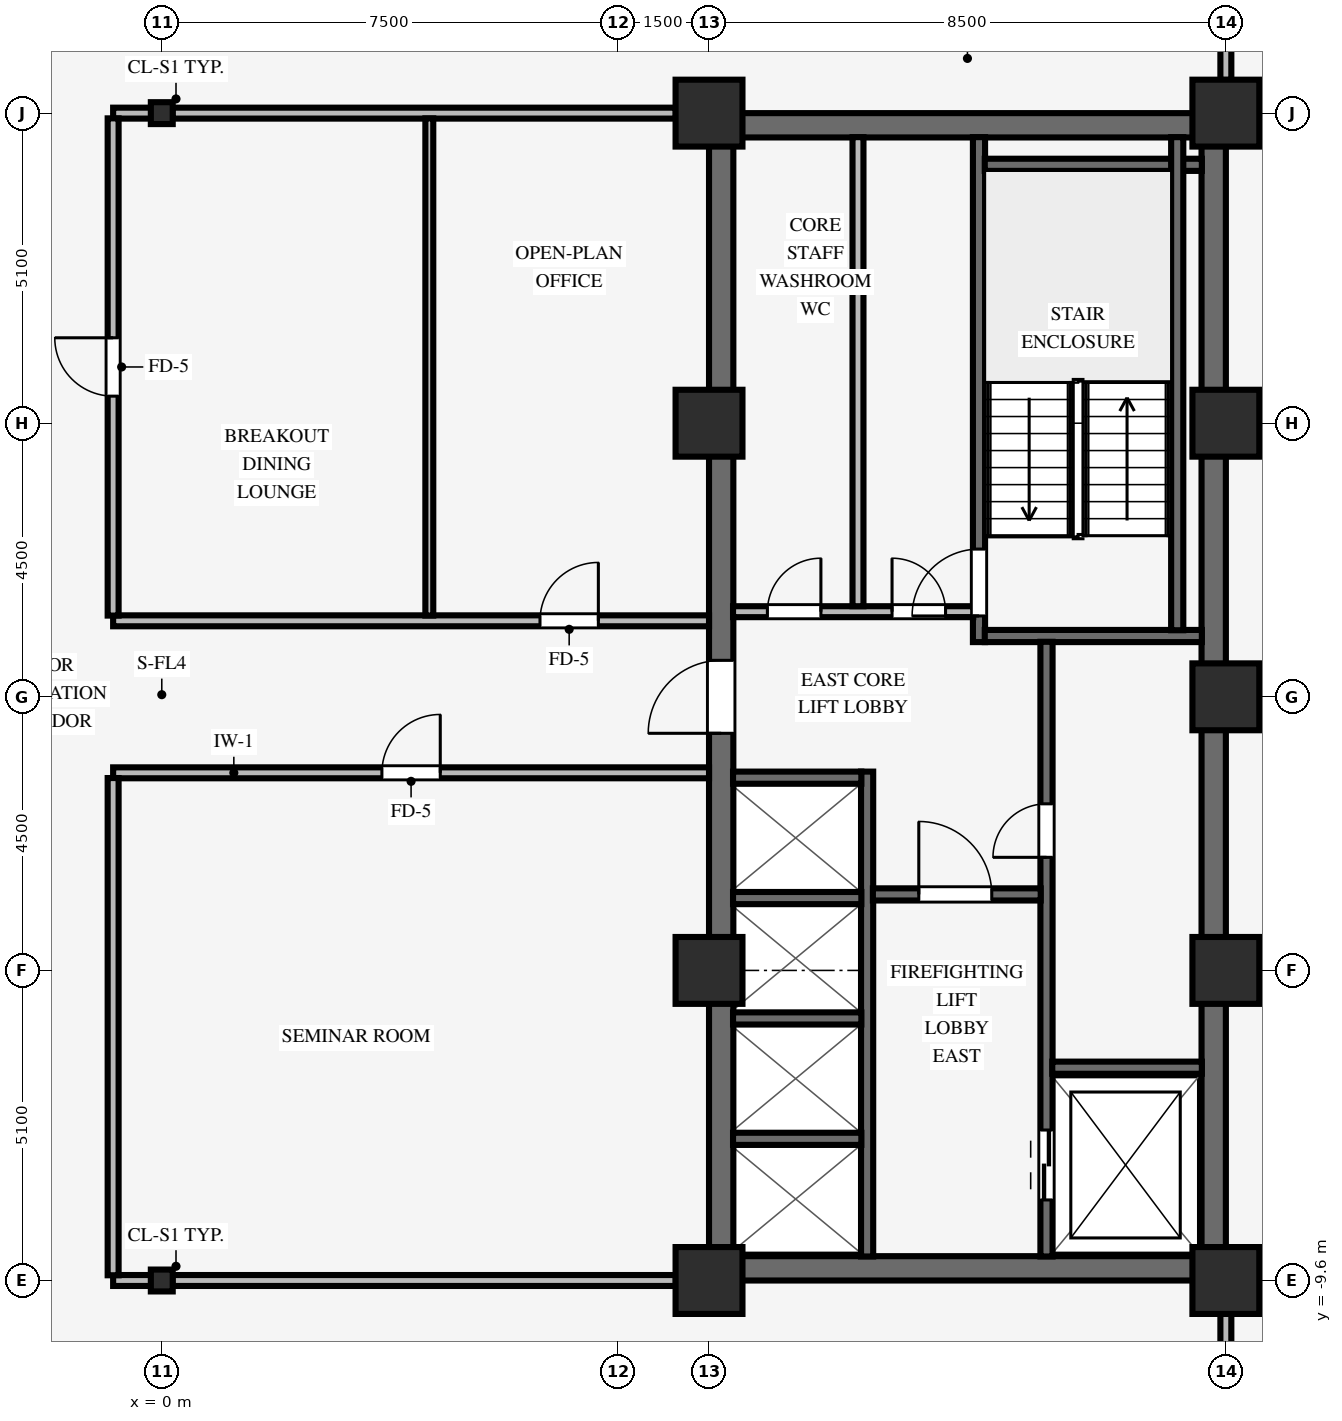
"""IFC4 building model, lengths in metres.
Left out: names, types, materials, properties, quantities, classifications, styles, units other than length and angle.
Written with IfcOpenShell. Run it as: python <this file> out.ifc"""

import sys

from ifc_helpers import new_model, si_unit, direction, frame, frame_2d, origin, origin_2d, place, context, subcontext, project, spatial, rectangle, i_section, extrude, source, transform, mapped, element, fill, save


model = new_model("IFC4")
c1 = context("Model", 3, precision=1e-05, world=origin(), true_north=direction((0.0, 1.0)))
c2 = subcontext(c1, "Body", "Model", "MODEL_VIEW")
j1 = project(units=[si_unit("LENGTHUNIT", "METRE"), si_unit("PLANEANGLEUNIT", "RADIAN")], contexts=[c1])
p1 = place(None, origin())
s1 = spatial("IfcSite", under=j1, at=p1, CompositionType="ELEMENT")
p2 = place(p1, origin())
s2 = spatial("IfcBuilding", under=s1, at=p2, CompositionType="ELEMENT")
p3 = place(p2, frame((0.0, 0.0, 101.95)))
s3 = spatial("IfcBuildingStorey", under=s2, at=p3, CompositionType="ELEMENT", Elevation=101.95)
for number, where, z_axis, x_axis in (
    (1, (9.0, -9.4, 0.0), (0.0, 0.0, 1.0), (1.0, 0.0, 0.0)),
    (2, (9.0, 9.4, 0.0), (0.0, 0.0, 1.0), (1.0, 0.0, 0.0)),
):
    element("IfcWall", number, at=place(p3, frame(where, z_axis=z_axis, x_axis=x_axis)), inside=s3, PredefinedType="SHEAR", context=c2, shape_type="SweptSolid", body=[
        extrude(rectangle(XDim=8.5, YDim=0.4, at=frame_2d((4.25, 0.0))), origin(), (0.0, 0.0, 1.0), 3.37),
    ])
p4 = place(p3, frame((9.2, -9.205, 0.0), z_axis=(0.0, 0.0, 1.0), x_axis=(0.0, 1.0, 0.0)))
e3 = element("IfcWall", 3, at=p4, inside=s3, PredefinedType="SHEAR", context=c2, shape_type="SweptSolid", body=[
    extrude(rectangle(XDim=18.41, YDim=0.4, at=frame_2d((9.205, 0.0))), origin(), (0.0, 0.0, 1.0), 3.37),
])
p5 = place(p4, frame((8.605, 0.0, 0.0)))
e4 = element("IfcOpeningElement", 4, at=p5, cuts=e3, PredefinedType="OPENING", context=c2, shape_type="SweptSolid", body=[
    extrude(rectangle(XDim=1.2, YDim=2.15, at=frame_2d((0.6, 1.075))), frame((0.0, 0.21, 0.0), z_axis=(0.0, -1.0, 0.0), x_axis=(1.0, 0.0, 0.0)), (0.0, 0.0, 1.0), 0.42),
])
p6 = place(p3, frame((17.3, -9.205, 0.0), z_axis=(0.0, 0.0, 1.0), x_axis=(0.0, 1.0, 0.0)))
e5 = element("IfcWall", 5, at=p6, inside=s3, PredefinedType="SHEAR", context=c2, shape_type="SweptSolid", body=[
    extrude(rectangle(XDim=18.41, YDim=0.4, at=frame_2d((9.205, 0.0))), origin(), (0.0, 0.0, 1.0), 3.37),
])
for number, where, z_axis, x_axis in (
    (6, (9.0, -9.6, 0.0), (0.0, 0.0, 1.0), (1.0, 0.0, 0.0)),
    (7, (9.0, -4.5, 0.0), (0.0, 0.0, 1.0), (1.0, 0.0, 0.0)),
    (8, (9.0, 4.5, 0.0), (0.0, 0.0, 1.0), (1.0, 0.0, 0.0)),
    (9, (9.0, 9.6, 0.0), (0.0, 0.0, 1.0), (1.0, 0.0, 0.0)),
    (10, (17.5, -9.6, 0.0), (0.0, 0.0, 1.0), (1.0, 0.0, 0.0)),
    (11, (17.5, -4.5, 0.0), (0.0, 0.0, 1.0), (1.0, 0.0, 0.0)),
    (12, (17.5, 4.5, 0.0), (0.0, 0.0, 1.0), (1.0, 0.0, 0.0)),
    (13, (17.5, 9.6, 0.0), (0.0, 0.0, 1.0), (1.0, 0.0, 0.0)),
    (14, (17.5, 0.0, 0.0), (0.0, 0.0, 1.0), (1.0, 0.0, 0.0)),
):
    element("IfcColumn", number, at=place(p3, frame(where, z_axis=z_axis, x_axis=x_axis)), inside=s3, PredefinedType="COLUMN", context=c2, shape_type="SweptSolid", body=[
        extrude(rectangle(XDim=1.1, YDim=1.1, at=origin_2d()), origin(), (0.0, 0.0, 1.0), 3.37),
    ])
for number, where, z_axis, x_axis in (
    (15, (0.0, -9.6, 0.0), (0.0, 0.0, 1.0), (1.0, 0.0, 0.0)),
    (16, (0.0, 9.6, 0.0), (0.0, 0.0, 1.0), (1.0, 0.0, 0.0)),
):
    element("IfcColumn", number, at=place(p3, frame(where, z_axis=z_axis, x_axis=x_axis)), inside=s3, PredefinedType="COLUMN", context=c2, shape_type="SweptSolid", body=[
        extrude(i_section(OverallWidth=0.36, OverallDepth=0.36, WebThickness=0.021, FlangeThickness=0.021, FilletRadius=0.018, at=origin_2d()), origin(), (0.0, 0.0, 1.0), 3.37),
    ])
p7 = place(p3, frame((13.44, 0.9, 0.0), z_axis=(0.0, 0.0, 1.0), x_axis=(0.0, 1.0, 0.0)))
e17 = element("IfcWall", 17, at=p7, inside=s3, PredefinedType="SHEAR", context=c2, shape_type="SweptSolid", body=[
    extrude(rectangle(XDim=8.305, YDim=0.2, at=frame_2d((4.153, 0.0))), origin(), (0.0, 0.0, 1.0), 3.37),
])
p8 = place(p7, frame((0.43, 0.0, 0.0)))
e18 = element("IfcOpeningElement", 18, at=p8, cuts=e17, PredefinedType="OPENING", context=c2, shape_type="SweptSolid", body=[
    extrude(rectangle(XDim=1.1, YDim=2.15, at=frame_2d((0.55, 1.075))), frame((0.0, 0.11, 0.0), z_axis=(0.0, -1.0, 0.0), x_axis=(1.0, 0.0, 0.0)), (0.0, 0.0, 1.0), 0.22),
])
for number, where, z_axis, x_axis in (
    (19, (13.535, 1.0, 0.0), (0.0, 0.0, 1.0), (1.0, 0.0, 0.0)),
    (20, (13.535, 8.75, 0.0), (0.0, 0.0, 1.0), (1.0, 0.0, 0.0)),
):
    element("IfcWall", number, at=place(p3, frame(where, z_axis=z_axis, x_axis=x_axis)), inside=s3, PredefinedType="SHEAR", context=c2, shape_type="SweptSolid", body=[
        extrude(rectangle(XDim=3.57, YDim=0.2, at=frame_2d((1.785, 0.0))), origin(), (0.0, 0.0, 1.0), 3.37),
    ])
p9 = place(p3, frame((16.7, 1.095, 0.0), z_axis=(0.0, 0.0, 1.0), x_axis=(0.0, 1.0, 0.0)))
e21 = element("IfcWall", 21, at=p9, inside=s3, PredefinedType="SHEAR", context=c2, shape_type="SweptSolid", body=[
    extrude(rectangle(XDim=8.11, YDim=0.2, at=frame_2d((4.055, 0.0))), origin(), (0.0, 0.0, 1.0), 3.37),
])
p10 = place(p3, frame((14.55, -9.205, 0.0), z_axis=(0.0, 0.0, 1.0), x_axis=(0.0, 1.0, 0.0)))
e22 = element("IfcWall", 22, at=p10, inside=s3, PredefinedType="SHEAR", context=c2, shape_type="SweptSolid", body=[
    extrude(rectangle(XDim=10.11, YDim=0.2, at=frame_2d((5.055, 0.0))), origin(), (0.0, 0.0, 1.0), 3.37),
])
p11 = place(p10, frame((6.565, 0.0, 0.0)))
e23 = element("IfcOpeningElement", 23, at=p11, cuts=e22, PredefinedType="OPENING", context=c2, shape_type="SweptSolid", body=[
    extrude(rectangle(XDim=0.88, YDim=2.1, at=frame_2d((0.44, 1.05))), frame((0.0, 0.11, 0.0), z_axis=(0.0, -1.0, 0.0), x_axis=(1.0, 0.0, 0.0)), (0.0, 0.0, 1.0), 0.22),
])
p12 = place(p10, frame((0.93, 0.0, 0.0)))
e24 = element("IfcOpeningElement", 24, at=p12, cuts=e22, PredefinedType="OPENING", context=c2, shape_type="SweptSolid", body=[
    extrude(rectangle(XDim=1.15, YDim=2.15, at=frame_2d((0.575, 1.075))), frame((0.0, 0.11, 0.0), z_axis=(0.0, -1.0, 0.0), x_axis=(1.0, 0.0, 0.0)), (0.0, 0.0, 1.0), 0.22),
])
p13 = place(p3, frame((14.645, -6.1, 0.0), z_axis=(0.0, 0.0, 1.0), x_axis=(1.0, 0.0, 0.0)))
e25 = element("IfcWall", 25, at=p13, inside=s3, PredefinedType="SHEAR", context=c2, shape_type="SweptSolid", body=[
    extrude(rectangle(XDim=2.46, YDim=0.2, at=frame_2d((1.23, 0.0))), origin(), (0.0, 0.0, 1.0), 3.37),
])
p14 = place(p3, frame((11.6, -9.205, 0.0), z_axis=(0.0, 0.0, 1.0), x_axis=(0.0, 1.0, 0.0)))
e26 = element("IfcWall", 26, at=p14, inside=s3, PredefinedType="SHEAR", context=c2, shape_type="SweptSolid", body=[
    extrude(rectangle(XDim=7.975, YDim=0.2, at=frame_2d((3.988, 0.0))), origin(), (0.0, 0.0, 1.0), 3.37),
])
p15 = place(p3, frame((11.695, -3.25, 0.0), z_axis=(0.0, 0.0, 1.0), x_axis=(1.0, 0.0, 0.0)))
e27 = element("IfcWall", 27, at=p15, inside=s3, PredefinedType="SHEAR", context=c2, shape_type="SweptSolid", body=[
    extrude(rectangle(XDim=2.76, YDim=0.2, at=frame_2d((1.38, 0.0))), origin(), (0.0, 0.0, 1.0), 3.37),
])
p16 = place(p15, frame((0.755, 0.0, 0.0)))
e28 = element("IfcOpeningElement", 28, at=p16, cuts=e27, PredefinedType="OPENING", context=c2, shape_type="SweptSolid", body=[
    extrude(rectangle(XDim=1.2, YDim=2.15, at=frame_2d((0.6, 1.075))), frame((0.0, 0.11, 0.0), z_axis=(0.0, -1.0, 0.0), x_axis=(1.0, 0.0, 0.0)), (0.0, 0.0, 1.0), 0.22),
])
for number, where, z_axis, x_axis in (
    (29, (9.395, -7.27, 0.0), (0.0, 0.0, 1.0), (1.0, 0.0, 0.0)),
    (30, (9.395, -5.29, 0.0), (0.0, 0.0, 1.0), (1.0, 0.0, 0.0)),
    (31, (9.395, -3.31, 0.0), (0.0, 0.0, 1.0), (1.0, 0.0, 0.0)),
    (32, (9.395, -1.33, 0.0), (0.0, 0.0, 1.0), (1.0, 0.0, 0.0)),
):
    element("IfcWall", number, at=place(p3, frame(where, z_axis=z_axis, x_axis=x_axis)), inside=s3, PredefinedType="SHEAR", context=c2, shape_type="SweptSolid", body=[
        extrude(rectangle(XDim=2.11, YDim=0.2, at=frame_2d((1.055, 0.0))), origin(), (0.0, 0.0, 1.0), 3.37),
    ])
p17 = place(p3, frame((9.395, 1.4, 0.0), z_axis=(0.0, 0.0, 1.0), x_axis=(1.0, 0.0, 0.0)))
e33 = element("IfcWall", 33, at=p17, inside=s3, PredefinedType="PARTITIONING", context=c2, shape_type="SweptSolid", body=[
    extrude(rectangle(XDim=3.95, YDim=0.18, at=frame_2d((1.975, 0.0))), origin(), (0.0, 0.0, 1.0), 3.36),
])
p18 = place(p17, frame((0.565, 0.0, 0.0)))
e34 = element("IfcOpeningElement", 34, at=p18, cuts=e33, PredefinedType="OPENING", context=c2, shape_type="SweptSolid", body=[
    extrude(rectangle(XDim=0.88, YDim=2.1, at=frame_2d((0.44, 1.05))), frame((0.0, 0.1, 0.0), z_axis=(0.0, -1.0, 0.0), x_axis=(1.0, 0.0, 0.0)), (0.0, 0.0, 1.0), 0.2),
])
p19 = place(p17, frame((2.615, 0.0, 0.0)))
e35 = element("IfcOpeningElement", 35, at=p19, cuts=e33, PredefinedType="OPENING", context=c2, shape_type="SweptSolid", body=[
    extrude(rectangle(XDim=0.88, YDim=2.1, at=frame_2d((0.44, 1.05))), frame((0.0, 0.1, 0.0), z_axis=(0.0, -1.0, 0.0), x_axis=(1.0, 0.0, 0.0)), (0.0, 0.0, 1.0), 0.2),
])
p20 = place(p3, frame((11.45, 1.49, 0.0), z_axis=(0.0, 0.0, 1.0), x_axis=(0.0, 1.0, 0.0)))
e36 = element("IfcWall", 36, at=p20, inside=s3, PredefinedType="PARTITIONING", context=c2, shape_type="SweptSolid", body=[
    extrude(rectangle(XDim=7.715, YDim=0.18, at=frame_2d((3.857, 0.0))), origin(), (0.0, 0.0, 1.0), 3.36),
])
p21 = place(p3, frame((-0.8, -9.6, 0.0), z_axis=(0.0, 0.0, 1.0), x_axis=(1.0, 0.0, 0.0)))
e37 = element("IfcWall", 37, at=p21, inside=s3, PredefinedType="PARTITIONING", context=c2, shape_type="SweptSolid", body=[
    extrude(rectangle(XDim=0.624, YDim=0.18, at=frame_2d((0.312, 0.0))), origin(), (0.0, 0.0, 1.0), 2.405),
])
p22 = place(p3, frame((0.176, -9.6, 0.0), z_axis=(0.0, 0.0, 1.0), x_axis=(1.0, 0.0, 0.0)))
e38 = element("IfcWall", 38, at=p22, inside=s3, PredefinedType="PARTITIONING", context=c2, shape_type="SweptSolid", body=[
    extrude(rectangle(XDim=8.278, YDim=0.18, at=frame_2d((4.139, 0.0))), origin(), (0.0, 0.0, 1.0), 2.405),
])
p23 = place(p3, frame((-0.8, -1.25, 0.0), z_axis=(0.0, 0.0, 1.0), x_axis=(1.0, 0.0, 0.0)))
e39 = element("IfcWall", 39, at=p23, inside=s3, PredefinedType="PARTITIONING", context=c2, shape_type="SweptSolid", body=[
    extrude(rectangle(XDim=9.8, YDim=0.18, at=frame_2d((4.9, 0.0))), origin(), (0.0, 0.0, 1.0), 3.36),
])
p24 = place(p23, frame((4.42, 0.0, 0.0)))
e40 = element("IfcOpeningElement", 40, at=p24, cuts=e39, PredefinedType="OPENING", context=c2, shape_type="SweptSolid", body=[
    extrude(rectangle(XDim=0.96, YDim=2.1, at=frame_2d((0.48, 1.05))), frame((0.0, 0.1, 0.0), z_axis=(0.0, -1.0, 0.0), x_axis=(1.0, 0.0, 0.0)), (0.0, 0.0, 1.0), 0.2),
])
p25 = place(p3, frame((-0.8, 1.25, 0.0), z_axis=(0.0, 0.0, 1.0), x_axis=(1.0, 0.0, 0.0)))
e41 = element("IfcWall", 41, at=p25, inside=s3, PredefinedType="PARTITIONING", context=c2, shape_type="SweptSolid", body=[
    extrude(rectangle(XDim=9.8, YDim=0.18, at=frame_2d((4.9, 0.0))), origin(), (0.0, 0.0, 1.0), 3.36),
])
p26 = place(p25, frame((7.02, 0.0, 0.0)))
e42 = element("IfcOpeningElement", 42, at=p26, cuts=e41, PredefinedType="OPENING", context=c2, shape_type="SweptSolid", body=[
    extrude(rectangle(XDim=0.96, YDim=2.1, at=frame_2d((0.48, 1.05))), frame((0.0, 0.1, 0.0), z_axis=(0.0, -1.0, 0.0), x_axis=(1.0, 0.0, 0.0)), (0.0, 0.0, 1.0), 0.2),
])
p27 = place(p3, frame((-0.8, 9.6, 0.0), z_axis=(0.0, 0.0, 1.0), x_axis=(1.0, 0.0, 0.0)))
e43 = element("IfcWall", 43, at=p27, inside=s3, PredefinedType="PARTITIONING", context=c2, shape_type="SweptSolid", body=[
    extrude(rectangle(XDim=0.624, YDim=0.18, at=frame_2d((0.312, 0.0))), origin(), (0.0, 0.0, 1.0), 2.405),
])
p28 = place(p3, frame((0.176, 9.6, 0.0), z_axis=(0.0, 0.0, 1.0), x_axis=(1.0, 0.0, 0.0)))
e44 = element("IfcWall", 44, at=p28, inside=s3, PredefinedType="PARTITIONING", context=c2, shape_type="SweptSolid", body=[
    extrude(rectangle(XDim=8.278, YDim=0.18, at=frame_2d((4.139, 0.0))), origin(), (0.0, 0.0, 1.0), 2.405),
])
p29 = place(p3, frame((-0.8, -9.514, 0.0), z_axis=(0.0, 0.0, 1.0), x_axis=(0.0, 1.0, 0.0)))
e45 = element("IfcWall", 45, at=p29, inside=s3, PredefinedType="PARTITIONING", context=c2, shape_type="SweptSolid", body=[
    extrude(rectangle(XDim=8.178, YDim=0.18, at=frame_2d((4.089, 0.0))), origin(), (0.0, 0.0, 1.0), 3.36),
])
p30 = place(p3, frame((-0.8, 1.336, 0.0), z_axis=(0.0, 0.0, 1.0), x_axis=(0.0, 1.0, 0.0)))
e46 = element("IfcWall", 46, at=p30, inside=s3, PredefinedType="PARTITIONING", context=c2, shape_type="SweptSolid", body=[
    extrude(rectangle(XDim=8.178, YDim=0.18, at=frame_2d((4.089, 0.0))), origin(), (0.0, 0.0, 1.0), 3.36),
])
p31 = place(p30, frame((3.609, 0.0, 0.0)))
e47 = element("IfcOpeningElement", 47, at=p31, cuts=e46, PredefinedType="OPENING", context=c2, shape_type="SweptSolid", body=[
    extrude(rectangle(XDim=0.96, YDim=2.1, at=frame_2d((0.48, 1.05))), frame((0.0, 0.1, 0.0), z_axis=(0.0, -1.0, 0.0), x_axis=(1.0, 0.0, 0.0)), (0.0, 0.0, 1.0), 0.2),
])
p32 = place(p3, frame((4.4, 1.336, 0.0), z_axis=(0.0, 0.0, 1.0), x_axis=(0.0, 1.0, 0.0)))
e48 = element("IfcWall", 48, at=p32, inside=s3, PredefinedType="PARTITIONING", context=c2, shape_type="SweptSolid", body=[
    extrude(rectangle(XDim=8.178, YDim=0.13, at=frame_2d((4.089, 0.0))), origin(), (0.0, 0.0, 1.0), 3.36),
])
for number, where, z_axis, x_axis in (
    (49, (17.5, -11.114, 0.0), (0.0, 0.0, 1.0), (0.0, 1.0, 0.0)),
    (50, (17.5, 10.146, 0.0), (0.0, 0.0, 1.0), (0.0, 1.0, 0.0)),
):
    element("IfcWall", number, at=place(p3, frame(where, z_axis=z_axis, x_axis=x_axis)), inside=s3, PredefinedType="PARTITIONING", context=c2, shape_type="SweptSolid", body=[
        extrude(rectangle(XDim=0.968, YDim=0.18, at=frame_2d((0.484, 0.0))), origin(), (0.0, 0.0, 1.0), 2.738),
    ])
m1 = source(origin(), c2, "Body", "SweptSolid", [
    extrude(rectangle(XDim=1.1, YDim=2.15, at=frame_2d((0.55, 1.075))), frame((0.0, 0.025, 0.0), z_axis=(0.0, -1.0, 0.0), x_axis=(1.0, 0.0, 0.0)), (0.0, 0.0, 1.0), 0.05),
])
p33 = place(p8, origin())
e51 = element("IfcDoor", 51, at=p33, inside=s3, OperationType="SINGLE_SWING_LEFT", PredefinedType="DOOR", context=c2, shape_type="MappedRepresentation", body=[
    mapped(m1, transform((0.0, 0.0, 0.0), scale=1.0)),
])
fill(e18, e51)
m2 = source(origin(), c2, "Body", "SweptSolid", [
    extrude(rectangle(XDim=0.88, YDim=2.1, at=frame_2d((0.44, 1.05))), frame((0.0, 0.025, 0.0), z_axis=(0.0, -1.0, 0.0), x_axis=(1.0, 0.0, 0.0)), (0.0, 0.0, 1.0), 0.05),
])
p34 = place(p11, origin())
e52 = element("IfcDoor", 52, at=p34, inside=s3, OperationType="SINGLE_SWING_LEFT", PredefinedType="DOOR", context=c2, shape_type="MappedRepresentation", body=[
    mapped(m2, transform((0.0, 0.0, 0.0), scale=1.0)),
])
fill(e23, e52)
m3 = source(origin(), c2, "Body", "SweptSolid", [
    extrude(rectangle(XDim=1.2, YDim=2.15, at=frame_2d((0.6, 1.075))), frame((0.0, 0.025, 0.0), z_axis=(0.0, -1.0, 0.0), x_axis=(1.0, 0.0, 0.0)), (0.0, 0.0, 1.0), 0.05),
])
p35 = place(p16, origin())
e53 = element("IfcDoor", 53, at=p35, inside=s3, OperationType="SINGLE_SWING_LEFT", PredefinedType="DOOR", context=c2, shape_type="MappedRepresentation", body=[
    mapped(m3, transform((0.0, 0.0, 0.0), scale=1.0)),
])
fill(e28, e53)
p36 = place(p5, origin())
e54 = element("IfcDoor", 54, at=p36, inside=s3, OperationType="SINGLE_SWING_LEFT", PredefinedType="DOOR", context=c2, shape_type="MappedRepresentation", body=[
    mapped(m3, transform((0.0, 0.0, 0.0), scale=1.0)),
])
fill(e4, e54)
p37 = place(p18, origin())
e55 = element("IfcDoor", 55, at=p37, inside=s3, OperationType="SINGLE_SWING_RIGHT", PredefinedType="DOOR", context=c2, shape_type="MappedRepresentation", body=[
    mapped(m2, transform((0.0, 0.0, 0.0), scale=1.0)),
])
fill(e34, e55)
p38 = place(p19, origin())
e56 = element("IfcDoor", 56, at=p38, inside=s3, OperationType="SINGLE_SWING_LEFT", PredefinedType="DOOR", context=c2, shape_type="MappedRepresentation", body=[
    mapped(m2, transform((0.0, 0.0, 0.0), scale=1.0)),
])
fill(e35, e56)
m4 = source(origin(), c2, "Body", "SweptSolid", [
    extrude(rectangle(XDim=1.15, YDim=2.15, at=frame_2d((0.575, 1.075))), frame((0.0, 0.025, 0.0), z_axis=(0.0, -1.0, 0.0), x_axis=(1.0, 0.0, 0.0)), (0.0, 0.0, 1.0), 0.05),
])
p39 = place(p12, origin())
e57 = element("IfcDoor", 57, at=p39, inside=s3, OperationType="DOUBLE_DOOR_SLIDING", PredefinedType="DOOR", context=c2, shape_type="MappedRepresentation", body=[
    mapped(m4, transform((0.0, 0.0, 0.0), scale=1.0)),
])
fill(e24, e57)
m5 = source(origin(), c2, "Body", "SweptSolid", [
    extrude(rectangle(XDim=0.96, YDim=2.1, at=frame_2d((0.48, 1.05))), frame((0.0, 0.025, 0.0), z_axis=(0.0, -1.0, 0.0), x_axis=(1.0, 0.0, 0.0)), (0.0, 0.0, 1.0), 0.05),
])
p40 = place(p24, origin())
e58 = element("IfcDoor", 58, at=p40, inside=s3, OperationType="SINGLE_SWING_RIGHT", PredefinedType="DOOR", context=c2, shape_type="MappedRepresentation", body=[
    mapped(m5, transform((0.0, 0.0, 0.0), scale=1.0)),
])
fill(e40, e58)
p41 = place(p31, origin())
e59 = element("IfcDoor", 59, at=p41, inside=s3, OperationType="SINGLE_SWING_RIGHT", PredefinedType="DOOR", context=c2, shape_type="MappedRepresentation", body=[
    mapped(m5, transform((0.0, 0.0, 0.0), scale=1.0)),
])
fill(e47, e59)
p42 = place(p26, origin())
e60 = element("IfcDoor", 60, at=p42, inside=s3, OperationType="SINGLE_SWING_RIGHT", PredefinedType="DOOR", context=c2, shape_type="MappedRepresentation", body=[
    mapped(m5, transform((0.0, 0.0, 0.0), scale=1.0)),
])
fill(e42, e60)
save(model, sys.argv[1])
